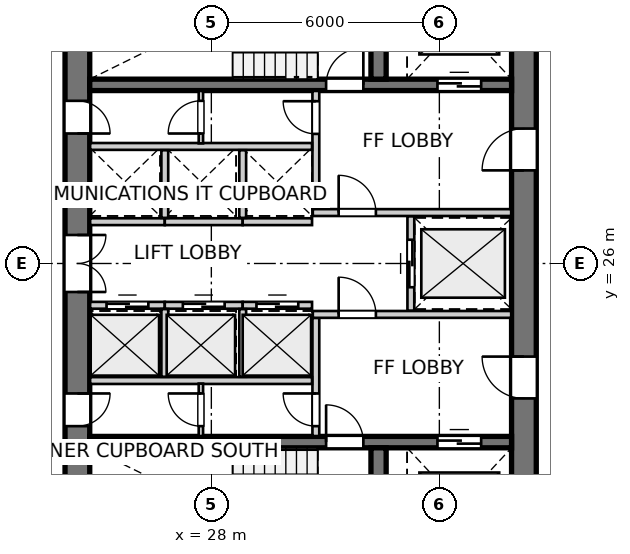
"""IFC4 building model, lengths in metres.
Left out: names, types, materials, properties, quantities, classifications, styles, units other than length and angle.
Written with IfcOpenShell. Run it as: python <this file> out.ifc"""

import sys

from ifc_helpers import new_model, si_unit, direction, frame, frame_2d, origin, place, context, subcontext, project, spatial, rectangle, extrude, source, transform, mapped, element, fill, save


model = new_model("IFC4")
c1 = context("Model", 3, precision=1e-05, world=origin(), true_north=direction((0.0, 1.0)))
c2 = subcontext(c1, "Body", "Model", "MODEL_VIEW")
j1 = project(units=[si_unit("LENGTHUNIT", "METRE"), si_unit("PLANEANGLEUNIT", "RADIAN")], contexts=[c1])
p1 = place(None, origin())
s1 = spatial("IfcSite", under=j1, at=p1, CompositionType="ELEMENT")
p2 = place(p1, origin())
s2 = spatial("IfcBuilding", under=s1, at=p2, CompositionType="ELEMENT")
p3 = place(p2, frame((0.0, 0.0, 83.2)))
s3 = spatial("IfcBuildingStorey", under=s2, at=p3, CompositionType="ELEMENT", Elevation=83.2)
p4 = place(p3, frame((24.475, 33.8, 0.0), z_axis=(0.0, 0.0, 1.0), x_axis=(0.0, -1.0, 0.0)))
e1 = element("IfcWall", 1, at=p4, inside=s3, PredefinedType="SHEAR", context=c2, shape_type="SweptSolid", body=[
    extrude(rectangle(XDim=15.6, YDim=0.65, at=frame_2d((7.8, 0.0))), origin(), (0.0, 0.0, 1.0), 2.935),
])
p5 = place(p4, frame((7.05, 0.0, 0.0)))
e2 = element("IfcOpeningElement", 2, at=p5, cuts=e1, PredefinedType="OPENING", context=c2, shape_type="SweptSolid", body=[
    extrude(rectangle(XDim=1.5, YDim=2.15, at=frame_2d((0.75, 1.075))), frame((0.0, 0.335, 0.0), z_axis=(0.0, -1.0, 0.0), x_axis=(1.0, 0.0, 0.0)), (0.0, 0.0, 1.0), 0.67),
])
p6 = place(p4, frame((3.52, 0.0, 0.0)))
e3 = element("IfcOpeningElement", 3, at=p6, cuts=e1, PredefinedType="OPENING", context=c2, shape_type="SweptSolid", body=[
    extrude(rectangle(XDim=0.86, YDim=2.05, at=frame_2d((0.43, 1.025))), frame((0.0, 0.335, 0.0), z_axis=(0.0, -1.0, 0.0), x_axis=(1.0, 0.0, 0.0)), (0.0, 0.0, 1.0), 0.67),
])
p7 = place(p4, frame((11.22, 0.0, 0.0)))
e4 = element("IfcOpeningElement", 4, at=p7, cuts=e1, PredefinedType="OPENING", context=c2, shape_type="SweptSolid", body=[
    extrude(rectangle(XDim=0.86, YDim=2.05, at=frame_2d((0.43, 1.025))), frame((0.0, 0.335, 0.0), z_axis=(0.0, -1.0, 0.0), x_axis=(1.0, 0.0, 0.0)), (0.0, 0.0, 1.0), 0.67),
])
p8 = place(p3, frame((36.225, 18.2, 0.0), z_axis=(0.0, 0.0, 1.0), x_axis=(0.0, 1.0, 0.0)))
e5 = element("IfcWall", 5, at=p8, inside=s3, PredefinedType="SHEAR", context=c2, shape_type="SweptSolid", body=[
    extrude(rectangle(XDim=15.6, YDim=0.65, at=frame_2d((7.8, 0.0))), origin(), (0.0, 0.0, 1.0), 2.935),
])
p9 = place(p8, frame((4.25, 0.0, 0.0)))
e6 = element("IfcOpeningElement", 6, at=p9, cuts=e5, PredefinedType="OPENING", context=c2, shape_type="SweptSolid", body=[
    extrude(rectangle(XDim=1.1, YDim=2.15, at=frame_2d((0.55, 1.075))), frame((0.0, 0.335, 0.0), z_axis=(0.0, -1.0, 0.0), x_axis=(1.0, 0.0, 0.0)), (0.0, 0.0, 1.0), 0.67),
])
p10 = place(p8, frame((10.25, 0.0, 0.0)))
e7 = element("IfcOpeningElement", 7, at=p10, cuts=e5, PredefinedType="OPENING", context=c2, shape_type="SweptSolid", body=[
    extrude(rectangle(XDim=1.1, YDim=2.15, at=frame_2d((0.55, 1.075))), frame((0.0, 0.335, 0.0), z_axis=(0.0, -1.0, 0.0), x_axis=(1.0, 0.0, 0.0)), (0.0, 0.0, 1.0), 0.67),
])
p11 = place(p3, frame((24.8, 21.3, 0.0), z_axis=(0.0, 0.0, 1.0), x_axis=(1.0, 0.0, 0.0)))
e8 = element("IfcWall", 8, at=p11, inside=s3, PredefinedType="SHEAR", context=c2, shape_type="SweptSolid", body=[
    extrude(rectangle(XDim=11.1, YDim=0.3, at=frame_2d((5.55, 0.0))), origin(), (0.0, 0.0, 1.0), 2.935),
])
p12 = place(p11, frame((6.22, 0.0, 0.0)))
e9 = element("IfcOpeningElement", 9, at=p12, cuts=e8, PredefinedType="OPENING", context=c2, shape_type="SweptSolid", body=[
    extrude(rectangle(XDim=0.98, YDim=2.15, at=frame_2d((0.49, 1.075))), frame((0.0, 0.16, 0.0), z_axis=(0.0, -1.0, 0.0), x_axis=(1.0, 0.0, 0.0)), (0.0, 0.0, 1.0), 0.32),
])
p13 = place(p11, frame((9.15, 0.0, 0.0)))
e10 = element("IfcOpeningElement", 10, at=p13, cuts=e8, PredefinedType="OPENING", context=c2, shape_type="SweptSolid", body=[
    extrude(rectangle(XDim=1.15, YDim=2.15, at=frame_2d((0.575, 1.075))), frame((0.0, 0.16, 0.0), z_axis=(0.0, -1.0, 0.0), x_axis=(1.0, 0.0, 0.0)), (0.0, 0.0, 1.0), 0.32),
])
p14 = place(p3, frame((32.4, 18.2, 0.0), z_axis=(0.0, 0.0, 1.0), x_axis=(0.0, 1.0, 0.0)))
e11 = element("IfcWall", 11, at=p14, inside=s3, PredefinedType="SHEAR", context=c2, shape_type="SweptSolid", body=[
    extrude(rectangle(XDim=2.95, YDim=0.4, at=frame_2d((1.475, 0.0))), origin(), (0.0, 0.0, 1.0), 2.935),
])
p15 = place(p3, frame((24.8, 30.7, 0.0), z_axis=(0.0, 0.0, 1.0), x_axis=(1.0, 0.0, 0.0)))
e12 = element("IfcWall", 12, at=p15, inside=s3, PredefinedType="SHEAR", context=c2, shape_type="SweptSolid", body=[
    extrude(rectangle(XDim=11.1, YDim=0.3, at=frame_2d((5.55, 0.0))), origin(), (0.0, 0.0, 1.0), 2.935),
])
p16 = place(p15, frame((6.22, 0.0, 0.0)))
e13 = element("IfcOpeningElement", 13, at=p16, cuts=e12, PredefinedType="OPENING", context=c2, shape_type="SweptSolid", body=[
    extrude(rectangle(XDim=0.98, YDim=2.15, at=frame_2d((0.49, 1.075))), frame((0.0, 0.16, 0.0), z_axis=(0.0, -1.0, 0.0), x_axis=(1.0, 0.0, 0.0)), (0.0, 0.0, 1.0), 0.32),
])
p17 = place(p15, frame((9.15, 0.0, 0.0)))
e14 = element("IfcOpeningElement", 14, at=p17, cuts=e12, PredefinedType="OPENING", context=c2, shape_type="SweptSolid", body=[
    extrude(rectangle(XDim=1.15, YDim=2.15, at=frame_2d((0.575, 1.075))), frame((0.0, 0.16, 0.0), z_axis=(0.0, -1.0, 0.0), x_axis=(1.0, 0.0, 0.0)), (0.0, 0.0, 1.0), 0.32),
])
p18 = place(p3, frame((32.4, 30.85, 0.0), z_axis=(0.0, 0.0, 1.0), x_axis=(0.0, 1.0, 0.0)))
e15 = element("IfcWall", 15, at=p18, inside=s3, PredefinedType="SHEAR", context=c2, shape_type="SweptSolid", body=[
    extrude(rectangle(XDim=2.95, YDim=0.4, at=frame_2d((1.475, 0.0))), origin(), (0.0, 0.0, 1.0), 2.935),
])
p19 = place(p3, frame((30.75, 21.46, 0.0), z_axis=(0.0, 0.0, 1.0), x_axis=(0.0, 1.0, 0.0)))
e16 = element("IfcWall", 16, at=p19, inside=s3, PredefinedType="PARTITIONING", context=c2, shape_type="SweptSolid", body=[
    extrude(rectangle(XDim=3.11, YDim=0.18, at=frame_2d((1.555, 0.0))), origin(), (0.0, 0.0, 1.0), 2.935),
])
p20 = place(p19, frame((0.26, 0.0, 0.0)))
e17 = element("IfcOpeningElement", 17, at=p20, cuts=e16, PredefinedType="OPENING", context=c2, shape_type="SweptSolid", body=[
    extrude(rectangle(XDim=0.86, YDim=2.05, at=frame_2d((0.43, 1.025))), frame((0.0, 0.1, 0.0), z_axis=(0.0, -1.0, 0.0), x_axis=(1.0, 0.0, 0.0)), (0.0, 0.0, 1.0), 0.2),
])
p21 = place(p3, frame((30.67, 24.66, 0.0), z_axis=(0.0, 0.0, 1.0), x_axis=(1.0, 0.0, 0.0)))
e18 = element("IfcWall", 18, at=p21, inside=s3, PredefinedType="PARTITIONING", context=c2, shape_type="SweptSolid", body=[
    extrude(rectangle(XDim=5.22, YDim=0.18, at=frame_2d((2.61, 0.0))), origin(), (0.0, 0.0, 1.0), 2.935),
])
p22 = place(p21, frame((0.68, 0.0, 0.0)))
e19 = element("IfcOpeningElement", 19, at=p22, cuts=e18, PredefinedType="OPENING", context=c2, shape_type="SweptSolid", body=[
    extrude(rectangle(XDim=0.98, YDim=2.15, at=frame_2d((0.49, 1.075))), frame((0.0, 0.1, 0.0), z_axis=(0.0, -1.0, 0.0), x_axis=(1.0, 0.0, 0.0)), (0.0, 0.0, 1.0), 0.2),
])
p23 = place(p3, frame((30.75, 27.43, 0.0), z_axis=(0.0, 0.0, 1.0), x_axis=(0.0, 1.0, 0.0)))
e20 = element("IfcWall", 20, at=p23, inside=s3, PredefinedType="PARTITIONING", context=c2, shape_type="SweptSolid", body=[
    extrude(rectangle(XDim=3.11, YDim=0.18, at=frame_2d((1.555, 0.0))), origin(), (0.0, 0.0, 1.0), 2.935),
])
p24 = place(p23, frame((1.98, 0.0, 0.0)))
e21 = element("IfcOpeningElement", 21, at=p24, cuts=e20, PredefinedType="OPENING", context=c2, shape_type="SweptSolid", body=[
    extrude(rectangle(XDim=0.86, YDim=2.05, at=frame_2d((0.43, 1.025))), frame((0.0, 0.1, 0.0), z_axis=(0.0, -1.0, 0.0), x_axis=(1.0, 0.0, 0.0)), (0.0, 0.0, 1.0), 0.2),
])
p25 = place(p3, frame((30.67, 27.34, 0.0), z_axis=(0.0, 0.0, 1.0), x_axis=(1.0, 0.0, 0.0)))
e22 = element("IfcWall", 22, at=p25, inside=s3, PredefinedType="PARTITIONING", context=c2, shape_type="SweptSolid", body=[
    extrude(rectangle(XDim=5.22, YDim=0.18, at=frame_2d((2.61, 0.0))), origin(), (0.0, 0.0, 1.0), 2.935),
])
p26 = place(p25, frame((0.68, 0.0, 0.0)))
e23 = element("IfcOpeningElement", 23, at=p26, cuts=e22, PredefinedType="OPENING", context=c2, shape_type="SweptSolid", body=[
    extrude(rectangle(XDim=0.98, YDim=2.15, at=frame_2d((0.49, 1.075))), frame((0.0, 0.1, 0.0), z_axis=(0.0, -1.0, 0.0), x_axis=(1.0, 0.0, 0.0)), (0.0, 0.0, 1.0), 0.2),
])
p27 = place(p3, frame((33.25, 24.76, 0.0), z_axis=(0.0, 0.0, 1.0), x_axis=(0.0, 1.0, 0.0)))
e24 = element("IfcWall", 24, at=p27, inside=s3, PredefinedType="PARTITIONING", context=c2, shape_type="SweptSolid", body=[
    extrude(rectangle(XDim=2.48, YDim=0.18, at=frame_2d((1.24, 0.0))), origin(), (0.0, 0.0, 1.0), 2.935),
])
p28 = place(p27, frame((0.615, 0.0, 0.0)))
e25 = element("IfcOpeningElement", 25, at=p28, cuts=e24, PredefinedType="OPENING", context=c2, shape_type="SweptSolid", body=[
    extrude(rectangle(XDim=1.25, YDim=2.15, at=frame_2d((0.625, 1.075))), frame((0.0, 0.1, 0.0), z_axis=(0.0, -1.0, 0.0), x_axis=(1.0, 0.0, 0.0)), (0.0, 0.0, 1.0), 0.2),
])
p29 = place(p3, frame((24.81, 22.92, 0.0), z_axis=(0.0, 0.0, 1.0), x_axis=(1.0, 0.0, 0.0)))
e26 = element("IfcWall", 26, at=p29, inside=s3, PredefinedType="PARTITIONING", context=c2, shape_type="SweptSolid", body=[
    extrude(rectangle(XDim=5.84, YDim=0.18, at=frame_2d((2.92, 0.0))), origin(), (0.0, 0.0, 1.0), 2.935),
])
p30 = place(p3, frame((24.81, 24.9, 0.0), z_axis=(0.0, 0.0, 1.0), x_axis=(1.0, 0.0, 0.0)))
e27 = element("IfcWall", 27, at=p30, inside=s3, PredefinedType="PARTITIONING", context=c2, shape_type="SweptSolid", body=[
    extrude(rectangle(XDim=1.965, YDim=0.18, at=frame_2d((0.982, 0.0))), origin(), (0.0, 0.0, 1.0), 2.935),
])
p31 = place(p30, frame((0.433, 0.0, 0.0)))
e28 = element("IfcOpeningElement", 28, at=p31, cuts=e27, PredefinedType="OPENING", context=c2, shape_type="SweptSolid", body=[
    extrude(rectangle(XDim=1.1, YDim=2.15, at=frame_2d((0.55, 1.075))), frame((0.0, 0.1, 0.0), z_axis=(0.0, -1.0, 0.0), x_axis=(1.0, 0.0, 0.0)), (0.0, 0.0, 1.0), 0.2),
])
p32 = place(p3, frame((26.775, 24.9, 0.0), z_axis=(0.0, 0.0, 1.0), x_axis=(1.0, 0.0, 0.0)))
e29 = element("IfcWall", 29, at=p32, inside=s3, PredefinedType="PARTITIONING", context=c2, shape_type="SweptSolid", body=[
    extrude(rectangle(XDim=2.05, YDim=0.18, at=frame_2d((1.025, 0.0))), origin(), (0.0, 0.0, 1.0), 2.935),
])
p33 = place(p32, frame((0.475, 0.0, 0.0)))
e30 = element("IfcOpeningElement", 30, at=p33, cuts=e29, PredefinedType="OPENING", context=c2, shape_type="SweptSolid", body=[
    extrude(rectangle(XDim=1.1, YDim=2.15, at=frame_2d((0.55, 1.075))), frame((0.0, 0.1, 0.0), z_axis=(0.0, -1.0, 0.0), x_axis=(1.0, 0.0, 0.0)), (0.0, 0.0, 1.0), 0.2),
])
p34 = place(p3, frame((26.775, 23.02, 0.0), z_axis=(0.0, 0.0, 1.0), x_axis=(0.0, 1.0, 0.0)))
e31 = element("IfcWall", 31, at=p34, inside=s3, PredefinedType="PARTITIONING", context=c2, shape_type="SweptSolid", body=[
    extrude(rectangle(XDim=1.78, YDim=0.18, at=frame_2d((0.89, 0.0))), origin(), (0.0, 0.0, 1.0), 2.935),
])
p35 = place(p3, frame((28.825, 24.9, 0.0), z_axis=(0.0, 0.0, 1.0), x_axis=(1.0, 0.0, 0.0)))
e32 = element("IfcWall", 32, at=p35, inside=s3, PredefinedType="PARTITIONING", context=c2, shape_type="SweptSolid", body=[
    extrude(rectangle(XDim=1.825, YDim=0.18, at=frame_2d((0.913, 0.0))), origin(), (0.0, 0.0, 1.0), 2.935),
])
p36 = place(p35, frame((0.363, 0.0, 0.0)))
e33 = element("IfcOpeningElement", 33, at=p36, cuts=e32, PredefinedType="OPENING", context=c2, shape_type="SweptSolid", body=[
    extrude(rectangle(XDim=1.1, YDim=2.15, at=frame_2d((0.55, 1.075))), frame((0.0, 0.1, 0.0), z_axis=(0.0, -1.0, 0.0), x_axis=(1.0, 0.0, 0.0)), (0.0, 0.0, 1.0), 0.2),
])
p37 = place(p3, frame((28.825, 23.02, 0.0), z_axis=(0.0, 0.0, 1.0), x_axis=(0.0, 1.0, 0.0)))
e34 = element("IfcWall", 34, at=p37, inside=s3, PredefinedType="PARTITIONING", context=c2, shape_type="SweptSolid", body=[
    extrude(rectangle(XDim=1.78, YDim=0.18, at=frame_2d((0.89, 0.0))), origin(), (0.0, 0.0, 1.0), 2.935),
])
p38 = place(p3, frame((24.81, 29.08, 0.0), z_axis=(0.0, 0.0, 1.0), x_axis=(1.0, 0.0, 0.0)))
e35 = element("IfcWall", 35, at=p38, inside=s3, PredefinedType="PARTITIONING", context=c2, shape_type="SweptSolid", body=[
    extrude(rectangle(XDim=5.84, YDim=0.18, at=frame_2d((2.92, 0.0))), origin(), (0.0, 0.0, 1.0), 2.935),
])
p39 = place(p3, frame((24.81, 27.1, 0.0), z_axis=(0.0, 0.0, 1.0), x_axis=(1.0, 0.0, 0.0)))
e36 = element("IfcWall", 36, at=p39, inside=s3, PredefinedType="PARTITIONING", context=c2, shape_type="SweptSolid", body=[
    extrude(rectangle(XDim=1.965, YDim=0.18, at=frame_2d((0.982, 0.0))), origin(), (0.0, 0.0, 1.0), 2.935),
])
p40 = place(p3, frame((26.775, 27.1, 0.0), z_axis=(0.0, 0.0, 1.0), x_axis=(1.0, 0.0, 0.0)))
e37 = element("IfcWall", 37, at=p40, inside=s3, PredefinedType="PARTITIONING", context=c2, shape_type="SweptSolid", body=[
    extrude(rectangle(XDim=2.05, YDim=0.18, at=frame_2d((1.025, 0.0))), origin(), (0.0, 0.0, 1.0), 2.935),
])
p41 = place(p3, frame((26.775, 27.2, 0.0), z_axis=(0.0, 0.0, 1.0), x_axis=(0.0, 1.0, 0.0)))
e38 = element("IfcWall", 38, at=p41, inside=s3, PredefinedType="PARTITIONING", context=c2, shape_type="SweptSolid", body=[
    extrude(rectangle(XDim=1.78, YDim=0.18, at=frame_2d((0.89, 0.0))), origin(), (0.0, 0.0, 1.0), 2.935),
])
p42 = place(p3, frame((28.825, 27.1, 0.0), z_axis=(0.0, 0.0, 1.0), x_axis=(1.0, 0.0, 0.0)))
e39 = element("IfcWall", 39, at=p42, inside=s3, PredefinedType="PARTITIONING", context=c2, shape_type="SweptSolid", body=[
    extrude(rectangle(XDim=1.825, YDim=0.18, at=frame_2d((0.913, 0.0))), origin(), (0.0, 0.0, 1.0), 2.935),
])
p43 = place(p3, frame((28.825, 27.2, 0.0), z_axis=(0.0, 0.0, 1.0), x_axis=(0.0, 1.0, 0.0)))
e40 = element("IfcWall", 40, at=p43, inside=s3, PredefinedType="PARTITIONING", context=c2, shape_type="SweptSolid", body=[
    extrude(rectangle(XDim=1.78, YDim=0.18, at=frame_2d((0.89, 0.0))), origin(), (0.0, 0.0, 1.0), 2.935),
])
p44 = place(p3, frame((27.725, 21.46, 0.0), z_axis=(0.0, 0.0, 1.0), x_axis=(0.0, 1.0, 0.0)))
e41 = element("IfcWall", 41, at=p44, inside=s3, PredefinedType="PARTITIONING", context=c2, shape_type="SweptSolid", body=[
    extrude(rectangle(XDim=1.38, YDim=0.115, at=frame_2d((0.69, 0.0))), origin(), (0.0, 0.0, 1.0), 2.935),
])
p45 = place(p44, frame((0.26, 0.0, 0.0)))
e42 = element("IfcOpeningElement", 42, at=p45, cuts=e41, PredefinedType="OPENING", context=c2, shape_type="SweptSolid", body=[
    extrude(rectangle(XDim=0.86, YDim=2.05, at=frame_2d((0.43, 1.025))), frame((0.0, 0.067, 0.0), z_axis=(0.0, -1.0, 0.0), x_axis=(1.0, 0.0, 0.0)), (0.0, 0.0, 1.0), 0.135),
])
p46 = place(p3, frame((27.725, 29.16, 0.0), z_axis=(0.0, 0.0, 1.0), x_axis=(0.0, 1.0, 0.0)))
e43 = element("IfcWall", 43, at=p46, inside=s3, PredefinedType="PARTITIONING", context=c2, shape_type="SweptSolid", body=[
    extrude(rectangle(XDim=1.38, YDim=0.115, at=frame_2d((0.69, 0.0))), origin(), (0.0, 0.0, 1.0), 2.935),
])
p47 = place(p46, frame((0.26, 0.0, 0.0)))
e44 = element("IfcOpeningElement", 44, at=p47, cuts=e43, PredefinedType="OPENING", context=c2, shape_type="SweptSolid", body=[
    extrude(rectangle(XDim=0.86, YDim=2.05, at=frame_2d((0.43, 1.025))), frame((0.0, 0.067, 0.0), z_axis=(0.0, -1.0, 0.0), x_axis=(1.0, 0.0, 0.0)), (0.0, 0.0, 1.0), 0.135),
])
m1 = source(origin(), c2, "Body", "SweptSolid", [
    extrude(rectangle(XDim=0.98, YDim=2.15, at=frame_2d((0.49, 1.075))), frame((0.0, 0.025, 0.0), z_axis=(0.0, -1.0, 0.0), x_axis=(1.0, 0.0, 0.0)), (0.0, 0.0, 1.0), 0.05),
])
p48 = place(p12, origin())
e45 = element("IfcDoor", 45, at=p48, inside=s3, OperationType="SINGLE_SWING_LEFT", PredefinedType="DOOR", context=c2, shape_type="MappedRepresentation", body=[
    mapped(m1, transform((0.0, 0.0, 0.0), x_axis=(1.0, 0.0, 0.0), y_axis=(0.0, 1.0, 0.0), z_axis=(0.0, 0.0, 1.0), scale=1.0)),
])
fill(e9, e45)
m2 = source(origin(), c2, "Body", "SweptSolid", [
    extrude(rectangle(XDim=1.15, YDim=2.15, at=frame_2d((0.575, 1.075))), frame((0.0, 0.025, 0.0), z_axis=(0.0, -1.0, 0.0), x_axis=(1.0, 0.0, 0.0)), (0.0, 0.0, 1.0), 0.05),
])
p49 = place(p13, origin())
e46 = element("IfcDoor", 46, at=p49, inside=s3, OperationType="DOUBLE_DOOR_SLIDING", PredefinedType="DOOR", context=c2, shape_type="MappedRepresentation", body=[
    mapped(m2, transform((0.0, 0.0, 0.0), x_axis=(1.0, 0.0, 0.0), y_axis=(0.0, 1.0, 0.0), z_axis=(0.0, 0.0, 1.0), scale=1.0)),
])
fill(e10, e46)
p50 = place(p16, origin())
e47 = element("IfcDoor", 47, at=p50, inside=s3, OperationType="SINGLE_SWING_RIGHT", PredefinedType="DOOR", context=c2, shape_type="MappedRepresentation", body=[
    mapped(m1, transform((0.0, 0.0, 0.0), x_axis=(1.0, 0.0, 0.0), y_axis=(0.0, 1.0, 0.0), z_axis=(0.0, 0.0, 1.0), scale=1.0)),
])
fill(e13, e47)
p51 = place(p17, origin())
e48 = element("IfcDoor", 48, at=p51, inside=s3, OperationType="DOUBLE_DOOR_SLIDING", PredefinedType="DOOR", context=c2, shape_type="MappedRepresentation", body=[
    mapped(m2, transform((0.0, 0.0, 0.0), x_axis=(1.0, 0.0, 0.0), y_axis=(0.0, 1.0, 0.0), z_axis=(0.0, 0.0, 1.0), scale=1.0)),
])
fill(e14, e48)
m3 = source(origin(), c2, "Body", "SweptSolid", [
    extrude(rectangle(XDim=1.1, YDim=2.15, at=frame_2d((0.55, 1.075))), frame((0.0, 0.025, 0.0), z_axis=(0.0, -1.0, 0.0), x_axis=(1.0, 0.0, 0.0)), (0.0, 0.0, 1.0), 0.05),
])
p52 = place(p9, origin())
e49 = element("IfcDoor", 49, at=p52, inside=s3, OperationType="SINGLE_SWING_RIGHT", PredefinedType="DOOR", context=c2, shape_type="MappedRepresentation", body=[
    mapped(m3, transform((0.0, 0.0, 0.0), x_axis=(1.0, 0.0, 0.0), y_axis=(0.0, 1.0, 0.0), z_axis=(0.0, 0.0, 1.0), scale=1.0)),
])
fill(e6, e49)
p53 = place(p10, origin())
e50 = element("IfcDoor", 50, at=p53, inside=s3, OperationType="SINGLE_SWING_LEFT", PredefinedType="DOOR", context=c2, shape_type="MappedRepresentation", body=[
    mapped(m3, transform((0.0, 0.0, 0.0), x_axis=(1.0, 0.0, 0.0), y_axis=(0.0, 1.0, 0.0), z_axis=(0.0, 0.0, 1.0), scale=1.0)),
])
fill(e7, e50)
m4 = source(origin(), c2, "Body", "SweptSolid", [
    extrude(rectangle(XDim=1.5, YDim=2.15, at=frame_2d((0.75, 1.075))), frame((0.0, 0.025, 0.0), z_axis=(0.0, -1.0, 0.0), x_axis=(1.0, 0.0, 0.0)), (0.0, 0.0, 1.0), 0.05),
])
p54 = place(p5, origin())
e51 = element("IfcDoor", 51, at=p54, inside=s3, OperationType="DOUBLE_DOOR_SINGLE_SWING", PredefinedType="DOOR", context=c2, shape_type="MappedRepresentation", body=[
    mapped(m4, transform((0.0, 0.0, 0.0), x_axis=(1.0, 0.0, 0.0), y_axis=(0.0, 1.0, 0.0), z_axis=(0.0, 0.0, 1.0), scale=1.0)),
])
fill(e2, e51)
m5 = source(origin(), c2, "Body", "SweptSolid", [
    extrude(rectangle(XDim=0.86, YDim=2.05, at=frame_2d((0.43, 1.025))), frame((0.0, 0.025, 0.0), z_axis=(0.0, -1.0, 0.0), x_axis=(1.0, 0.0, 0.0)), (0.0, 0.0, 1.0), 0.05),
])
p55 = place(p6, origin())
e52 = element("IfcDoor", 52, at=p55, inside=s3, OperationType="SINGLE_SWING_RIGHT", PredefinedType="DOOR", context=c2, shape_type="MappedRepresentation", body=[
    mapped(m5, transform((0.0, 0.0, 0.0), x_axis=(1.0, 0.0, 0.0), y_axis=(0.0, 1.0, 0.0), z_axis=(0.0, 0.0, 1.0), scale=1.0)),
])
fill(e3, e52)
p56 = place(p7, origin())
e53 = element("IfcDoor", 53, at=p56, inside=s3, OperationType="SINGLE_SWING_LEFT", PredefinedType="DOOR", context=c2, shape_type="MappedRepresentation", body=[
    mapped(m5, transform((0.0, 0.0, 0.0), x_axis=(1.0, 0.0, 0.0), y_axis=(0.0, 1.0, 0.0), z_axis=(0.0, 0.0, 1.0), scale=1.0)),
])
fill(e4, e53)
p57 = place(p20, origin())
e54 = element("IfcDoor", 54, at=p57, inside=s3, OperationType="SINGLE_SWING_RIGHT", PredefinedType="DOOR", context=c2, shape_type="MappedRepresentation", body=[
    mapped(m5, transform((0.0, 0.0, 0.0), x_axis=(1.0, 0.0, 0.0), y_axis=(0.0, 1.0, 0.0), z_axis=(0.0, 0.0, 1.0), scale=1.0)),
])
fill(e17, e54)
p58 = place(p22, origin())
e55 = element("IfcDoor", 55, at=p58, inside=s3, OperationType="SINGLE_SWING_LEFT", PredefinedType="DOOR", context=c2, shape_type="MappedRepresentation", body=[
    mapped(m1, transform((0.0, 0.0, 0.0), x_axis=(1.0, 0.0, 0.0), y_axis=(0.0, 1.0, 0.0), z_axis=(0.0, 0.0, 1.0), scale=1.0)),
])
fill(e19, e55)
p59 = place(p24, origin())
e56 = element("IfcDoor", 56, at=p59, inside=s3, OperationType="SINGLE_SWING_RIGHT", PredefinedType="DOOR", context=c2, shape_type="MappedRepresentation", body=[
    mapped(m5, transform((0.0, 0.0, 0.0), x_axis=(1.0, 0.0, 0.0), y_axis=(0.0, 1.0, 0.0), z_axis=(0.0, 0.0, 1.0), scale=1.0)),
])
fill(e21, e56)
p60 = place(p26, origin())
e57 = element("IfcDoor", 57, at=p60, inside=s3, OperationType="SINGLE_SWING_LEFT", PredefinedType="DOOR", context=c2, shape_type="MappedRepresentation", body=[
    mapped(m1, transform((0.0, 0.0, 0.0), x_axis=(1.0, 0.0, 0.0), y_axis=(0.0, 1.0, 0.0), z_axis=(0.0, 0.0, 1.0), scale=1.0)),
])
fill(e23, e57)
m6 = source(origin(), c2, "Body", "SweptSolid", [
    extrude(rectangle(XDim=1.25, YDim=2.15, at=frame_2d((0.625, 1.075))), frame((0.0, 0.025, 0.0), z_axis=(0.0, -1.0, 0.0), x_axis=(1.0, 0.0, 0.0)), (0.0, 0.0, 1.0), 0.05),
])
p61 = place(p28, origin())
e58 = element("IfcDoor", 58, at=p61, inside=s3, OperationType="DOUBLE_DOOR_SLIDING", PredefinedType="DOOR", context=c2, shape_type="MappedRepresentation", body=[
    mapped(m6, transform((0.0, 0.0, 0.0), x_axis=(1.0, 0.0, 0.0), y_axis=(0.0, 1.0, 0.0), z_axis=(0.0, 0.0, 1.0), scale=1.0)),
])
fill(e25, e58)
p62 = place(p31, origin())
e59 = element("IfcDoor", 59, at=p62, inside=s3, OperationType="DOUBLE_DOOR_SLIDING", PredefinedType="DOOR", context=c2, shape_type="MappedRepresentation", body=[
    mapped(m3, transform((0.0, 0.0, 0.0), x_axis=(1.0, 0.0, 0.0), y_axis=(0.0, 1.0, 0.0), z_axis=(0.0, 0.0, 1.0), scale=1.0)),
])
fill(e28, e59)
p63 = place(p33, origin())
e60 = element("IfcDoor", 60, at=p63, inside=s3, OperationType="DOUBLE_DOOR_SLIDING", PredefinedType="DOOR", context=c2, shape_type="MappedRepresentation", body=[
    mapped(m3, transform((0.0, 0.0, 0.0), x_axis=(1.0, 0.0, 0.0), y_axis=(0.0, 1.0, 0.0), z_axis=(0.0, 0.0, 1.0), scale=1.0)),
])
fill(e30, e60)
p64 = place(p36, origin())
e61 = element("IfcDoor", 61, at=p64, inside=s3, OperationType="DOUBLE_DOOR_SLIDING", PredefinedType="DOOR", context=c2, shape_type="MappedRepresentation", body=[
    mapped(m3, transform((0.0, 0.0, 0.0), x_axis=(1.0, 0.0, 0.0), y_axis=(0.0, 1.0, 0.0), z_axis=(0.0, 0.0, 1.0), scale=1.0)),
])
fill(e33, e61)
p65 = place(p45, origin())
e62 = element("IfcDoor", 62, at=p65, inside=s3, OperationType="SINGLE_SWING_RIGHT", PredefinedType="DOOR", context=c2, shape_type="MappedRepresentation", body=[
    mapped(m5, transform((0.0, 0.0, 0.0), x_axis=(1.0, 0.0, 0.0), y_axis=(0.0, 1.0, 0.0), z_axis=(0.0, 0.0, 1.0), scale=1.0)),
])
fill(e42, e62)
p66 = place(p47, origin())
e63 = element("IfcDoor", 63, at=p66, inside=s3, OperationType="SINGLE_SWING_LEFT", PredefinedType="DOOR", context=c2, shape_type="MappedRepresentation", body=[
    mapped(m5, transform((0.0, 0.0, 0.0), x_axis=(1.0, 0.0, 0.0), y_axis=(0.0, 1.0, 0.0), z_axis=(0.0, 0.0, 1.0), scale=1.0)),
])
fill(e44, e63)
save(model, sys.argv[1])
